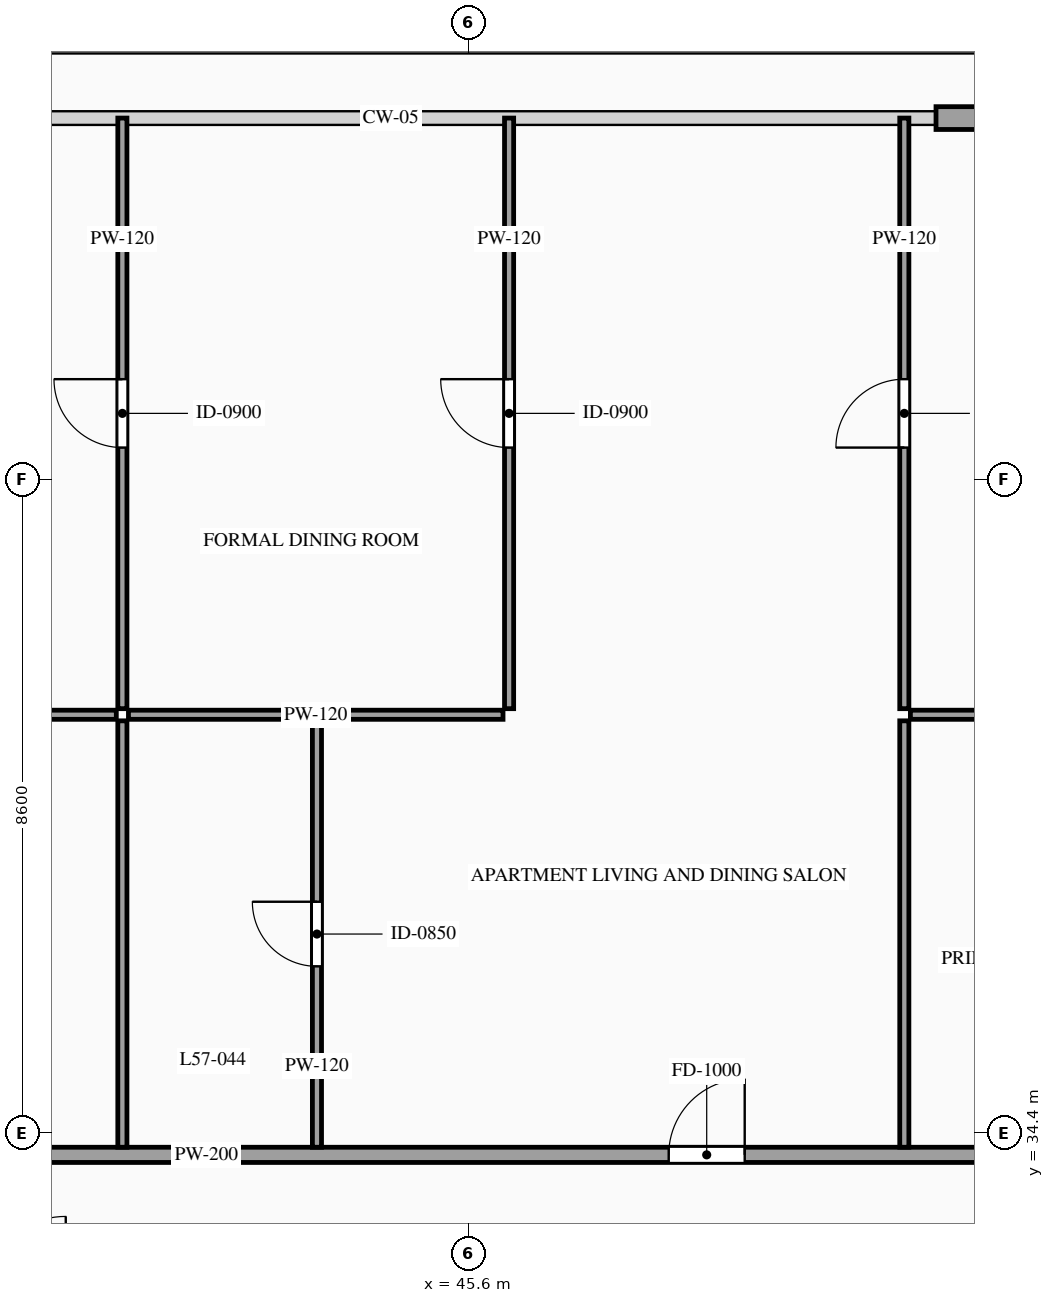
"""IFC4 building model, lengths in metres.
Left out: names, types, materials, properties, quantities, classifications, styles, units other than length and angle.
Written with IfcOpenShell. Run it as: python <this file> out.ifc"""

import sys

from ifc_helpers import new_model, si_unit, direction, frame, frame_2d, origin, place, context, subcontext, project, spatial, rectangle, extrude, source, transform, mapped, element, fill, save


model = new_model("IFC4")
c1 = context("Model", 3, precision=1e-05, world=origin(), true_north=direction((0.0, 1.0)))
c2 = subcontext(c1, "Body", "Model", "MODEL_VIEW")
j1 = project(units=[si_unit("LENGTHUNIT", "METRE"), si_unit("PLANEANGLEUNIT", "RADIAN")], contexts=[c1])
p1 = place(None, origin())
s1 = spatial("IfcSite", under=j1, at=p1, CompositionType="ELEMENT")
p2 = place(p1, origin())
s2 = spatial("IfcBuilding", under=s1, at=p2, CompositionType="ELEMENT")
p3 = place(p2, frame((0.0, 0.0, 216.0)))
s3 = spatial("IfcBuildingStorey", under=s2, at=p3, CompositionType="ELEMENT", Elevation=216.0)
m1 = source(origin(), c2, "Body", "SweptSolid", [
    extrude(rectangle(XDim=3.05, YDim=0.3, at=frame_2d((1.525, 0.0))), origin(), (0.0, 0.0, 1.0), 2.775),
])
p4 = place(p3, frame((51.75, 47.75, 0.0), z_axis=(0.0, 0.0, 1.0), x_axis=(1.0, 0.0, 0.0)))
e1 = element("IfcWall", 1, at=p4, inside=s3, PredefinedType="SOLIDWALL", context=c2, shape_type="MappedRepresentation", body=[
    mapped(m1, transform((0.0, 0.0, 0.0), scale=1.0)),
])
p5 = place(p3, frame((36.318, 34.11, 0.0), z_axis=(0.0, 0.0, 1.0), x_axis=(1.0, 0.0, 0.0)))
e2 = element("IfcWall", 2, at=p5, inside=s3, PredefinedType="PARTITIONING", context=c2, shape_type="SweptSolid", body=[
    extrude(rectangle(XDim=19.742, YDim=0.2, at=frame_2d((9.871, 0.0))), origin(), (0.0, 0.0, 1.0), 3.22),
])
p6 = place(p5, frame((11.915, 0.0, 0.0)))
e3 = element("IfcOpeningElement", 3, at=p6, cuts=e2, PredefinedType="OPENING", context=c2, shape_type="SweptSolid", body=[
    extrude(rectangle(XDim=1.0, YDim=2.2, at=frame_2d((0.5, 1.1))), frame((0.0, 0.115, 0.0), z_axis=(0.0, -1.0, 0.0), x_axis=(1.0, 0.0, 0.0)), (0.0, 0.0, 1.0), 0.23),
])
p7 = place(p3, frame((36.318, 39.9, 0.0), z_axis=(0.0, 0.0, 1.0), x_axis=(1.0, 0.0, 0.0)))
e4 = element("IfcWall", 4, at=p7, inside=s3, PredefinedType="PARTITIONING", context=c2, shape_type="SweptSolid", body=[
    extrude(rectangle(XDim=4.647, YDim=0.12, at=frame_2d((2.323, 0.0))), origin(), (0.0, 0.0, 1.0), 3.22),
])
p8 = place(p7, frame((1.898, 0.0, 0.0)))
e5 = element("IfcOpeningElement", 5, at=p8, cuts=e4, PredefinedType="OPENING", context=c2, shape_type="SweptSolid", body=[
    extrude(rectangle(XDim=0.85, YDim=2.1, at=frame_2d((0.425, 1.05))), frame((0.0, 0.075, 0.0), z_axis=(0.0, -1.0, 0.0), x_axis=(1.0, 0.0, 0.0)), (0.0, 0.0, 1.0), 0.15),
])
m2 = source(origin(), c2, "Body", "SweptSolid", [
    extrude(rectangle(XDim=5.61, YDim=0.12, at=frame_2d((2.805, 0.0))), origin(), (0.0, 0.0, 1.0), 3.22),
])
p9 = place(p3, frame((41.045, 34.21, 0.0), z_axis=(0.0, 0.0, 1.0), x_axis=(0.0, 1.0, 0.0)))
e6 = element("IfcWall", 6, at=p9, inside=s3, PredefinedType="PARTITIONING", context=c2, shape_type="MappedRepresentation", body=[
    mapped(m2, transform((0.0, 0.0, 0.0), scale=1.0)),
])
p10 = place(p3, frame((43.605, 34.21, 0.0), z_axis=(0.0, 0.0, 1.0), x_axis=(0.0, 1.0, 0.0)))
e7 = element("IfcWall", 7, at=p10, inside=s3, PredefinedType="PARTITIONING", context=c2, shape_type="SweptSolid", body=[
    extrude(rectangle(XDim=5.61, YDim=0.12, at=frame_2d((2.805, 0.0))), origin(), (0.0, 0.0, 1.0), 3.22),
])
p11 = place(p10, frame((2.38, 0.0, 0.0)))
e8 = element("IfcOpeningElement", 8, at=p11, cuts=e7, PredefinedType="OPENING", context=c2, shape_type="SweptSolid", body=[
    extrude(rectangle(XDim=0.85, YDim=2.1, at=frame_2d((0.425, 1.05))), frame((0.0, 0.075, 0.0), z_axis=(0.0, -1.0, 0.0), x_axis=(1.0, 0.0, 0.0)), (0.0, 0.0, 1.0), 0.15),
])
p12 = place(p3, frame((51.413, 39.9, 0.0), z_axis=(0.0, 0.0, 1.0), x_axis=(1.0, 0.0, 0.0)))
e9 = element("IfcWall", 9, at=p12, inside=s3, PredefinedType="PARTITIONING", context=c2, shape_type="SweptSolid", body=[
    extrude(rectangle(XDim=4.647, YDim=0.12, at=frame_2d((2.323, 0.0))), origin(), (0.0, 0.0, 1.0), 3.22),
])
p13 = place(p12, frame((1.898, 0.0, 0.0)))
e10 = element("IfcOpeningElement", 10, at=p13, cuts=e9, PredefinedType="OPENING", context=c2, shape_type="SweptSolid", body=[
    extrude(rectangle(XDim=0.85, YDim=2.1, at=frame_2d((0.425, 1.05))), frame((0.0, 0.075, 0.0), z_axis=(0.0, -1.0, 0.0), x_axis=(1.0, 0.0, 0.0)), (0.0, 0.0, 1.0), 0.15),
])
m3 = source(origin(), c2, "Body", "SweptSolid", [
    extrude(rectangle(XDim=5.61, YDim=0.12, at=frame_2d((2.805, 0.0))), origin(), (0.0, 0.0, 1.0), 1.615),
])
p14 = place(p3, frame((51.333, 34.21, 0.0), z_axis=(0.0, 0.0, 1.0), x_axis=(0.0, 1.0, 0.0)))
e11 = element("IfcWall", 11, at=p14, inside=s3, PredefinedType="PARTITIONING", context=c2, shape_type="MappedRepresentation", body=[
    mapped(m3, transform((0.0, 0.0, 0.0), scale=1.0)),
])
p15 = place(p3, frame((41.045, 39.98, 0.0), z_axis=(0.0, 0.0, 1.0), x_axis=(0.0, 1.0, 0.0)))
e12 = element("IfcWall", 12, at=p15, inside=s3, PredefinedType="PARTITIONING", context=c2, shape_type="SweptSolid", body=[
    extrude(rectangle(XDim=7.77, YDim=0.12, at=frame_2d((3.885, 0.0))), origin(), (0.0, 0.0, 1.0), 3.22),
])
p16 = place(p15, frame((3.435, 0.0, 0.0)))
e13 = element("IfcOpeningElement", 13, at=p16, cuts=e12, PredefinedType="OPENING", context=c2, shape_type="SweptSolid", body=[
    extrude(rectangle(XDim=0.9, YDim=2.15, at=frame_2d((0.45, 1.075))), frame((0.0, 0.075, 0.0), z_axis=(0.0, -1.0, 0.0), x_axis=(1.0, 0.0, 0.0)), (0.0, 0.0, 1.0), 0.15),
])
p17 = place(p3, frame((51.333, 39.98, 0.0), z_axis=(0.0, 0.0, 1.0), x_axis=(0.0, 1.0, 0.0)))
e14 = element("IfcWall", 14, at=p17, inside=s3, PredefinedType="PARTITIONING", context=c2, shape_type="SweptSolid", body=[
    extrude(rectangle(XDim=7.77, YDim=0.12, at=frame_2d((3.885, 0.0))), origin(), (0.0, 0.0, 1.0), 3.22),
])
p18 = place(p17, frame((3.435, 0.0, 0.0)))
e15 = element("IfcOpeningElement", 15, at=p18, cuts=e14, PredefinedType="OPENING", context=c2, shape_type="SweptSolid", body=[
    extrude(rectangle(XDim=0.9, YDim=2.15, at=frame_2d((0.45, 1.075))), frame((0.0, 0.075, 0.0), z_axis=(0.0, -1.0, 0.0), x_axis=(1.0, 0.0, 0.0)), (0.0, 0.0, 1.0), 0.15),
])
m4 = source(origin(), c2, "Body", "SweptSolid", [
    extrude(rectangle(XDim=4.928, YDim=0.12, at=frame_2d((2.464, 0.0))), origin(), (0.0, 0.0, 1.0), 3.22),
])
p19 = place(p3, frame((41.125, 39.9, 0.0), z_axis=(0.0, 0.0, 1.0), x_axis=(1.0, 0.0, 0.0)))
e16 = element("IfcWall", 16, at=p19, inside=s3, PredefinedType="PARTITIONING", context=c2, shape_type="MappedRepresentation", body=[
    mapped(m4, transform((0.0, 0.0, 0.0), scale=1.0)),
])
p20 = place(p3, frame((46.133, 39.98, 0.0), z_axis=(0.0, 0.0, 1.0), x_axis=(0.0, 1.0, 0.0)))
e17 = element("IfcWall", 17, at=p20, inside=s3, PredefinedType="PARTITIONING", context=c2, shape_type="SweptSolid", body=[
    extrude(rectangle(XDim=7.77, YDim=0.12, at=frame_2d((3.885, 0.0))), origin(), (0.0, 0.0, 1.0), 3.22),
])
p21 = place(p20, frame((3.435, 0.0, 0.0)))
e18 = element("IfcOpeningElement", 18, at=p21, cuts=e17, PredefinedType="OPENING", context=c2, shape_type="SweptSolid", body=[
    extrude(rectangle(XDim=0.9, YDim=2.15, at=frame_2d((0.45, 1.075))), frame((0.0, 0.075, 0.0), z_axis=(0.0, -1.0, 0.0), x_axis=(1.0, 0.0, 0.0)), (0.0, 0.0, 1.0), 0.15),
])
m5 = source(origin(), c2, "Body", "SweptSolid", [
    extrude(rectangle(XDim=1.0, YDim=2.2, at=frame_2d((0.5, 1.1))), frame((0.0, 0.025, 0.0), z_axis=(0.0, -1.0, 0.0), x_axis=(1.0, 0.0, 0.0)), (0.0, 0.0, 1.0), 0.05),
])
p22 = place(p6, origin())
e19 = element("IfcDoor", 19, at=p22, inside=s3, OperationType="SINGLE_SWING_RIGHT", PredefinedType="DOOR", context=c2, shape_type="MappedRepresentation", body=[
    mapped(m5, transform((0.0, 0.0, 0.0), scale=1.0)),
])
fill(e3, e19)
m6 = source(origin(), c2, "Body", "SweptSolid", [
    extrude(rectangle(XDim=0.85, YDim=2.1, at=frame_2d((0.425, 1.05))), frame((0.0, 0.025, 0.0), z_axis=(0.0, -1.0, 0.0), x_axis=(1.0, 0.0, 0.0)), (0.0, 0.0, 1.0), 0.05),
])
p23 = place(p11, origin())
e20 = element("IfcDoor", 20, at=p23, inside=s3, OperationType="SINGLE_SWING_RIGHT", PredefinedType="DOOR", context=c2, shape_type="MappedRepresentation", body=[
    mapped(m6, transform((0.0, 0.0, 0.0), scale=1.0)),
])
fill(e8, e20)
m7 = source(origin(), c2, "Body", "SweptSolid", [
    extrude(rectangle(XDim=0.9, YDim=2.15, at=frame_2d((0.45, 1.075))), frame((0.0, 0.025, 0.0), z_axis=(0.0, -1.0, 0.0), x_axis=(1.0, 0.0, 0.0)), (0.0, 0.0, 1.0), 0.05),
])
p24 = place(p16, origin())
e21 = element("IfcDoor", 21, at=p24, inside=s3, OperationType="SINGLE_SWING_RIGHT", PredefinedType="DOOR", context=c2, shape_type="MappedRepresentation", body=[
    mapped(m7, transform((0.0, 0.0, 0.0), scale=1.0)),
])
fill(e13, e21)
p25 = place(p18, origin())
e22 = element("IfcDoor", 22, at=p25, inside=s3, OperationType="SINGLE_SWING_LEFT", PredefinedType="DOOR", context=c2, shape_type="MappedRepresentation", body=[
    mapped(m7, transform((0.0, 0.0, 0.0), scale=1.0)),
])
fill(e15, e22)
p26 = place(p21, origin())
e23 = element("IfcDoor", 23, at=p26, inside=s3, OperationType="SINGLE_SWING_RIGHT", PredefinedType="DOOR", context=c2, shape_type="MappedRepresentation", body=[
    mapped(m7, transform((0.0, 0.0, 0.0), scale=1.0)),
])
fill(e18, e23)
save(model, sys.argv[1])
